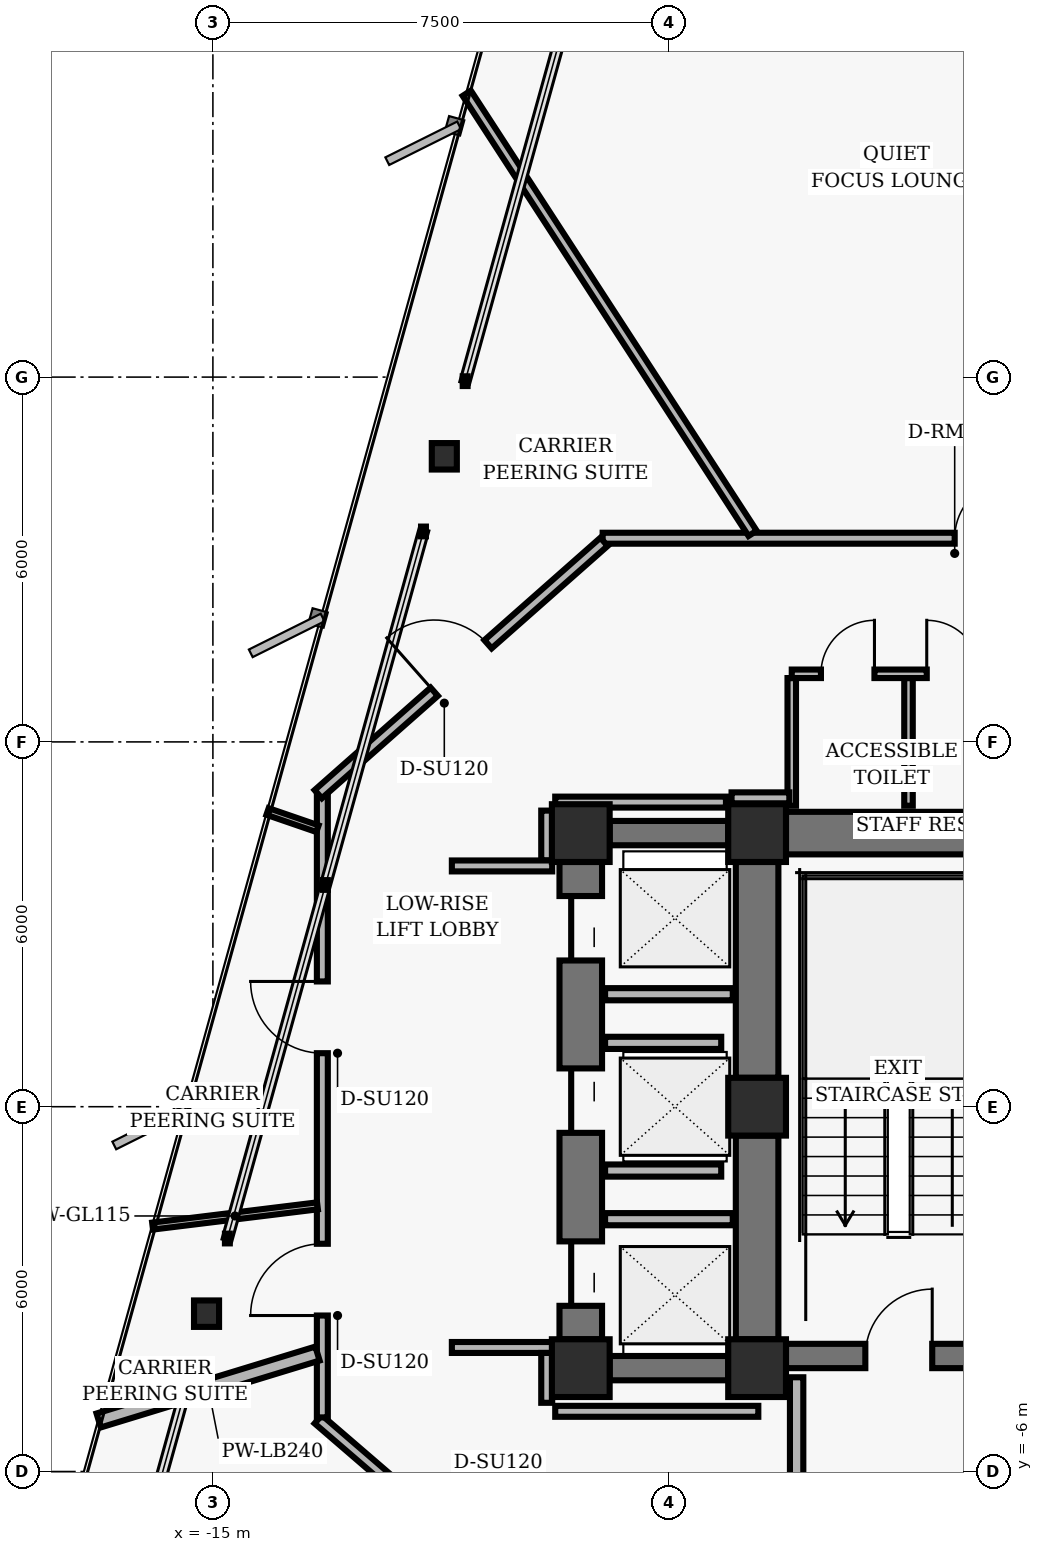
"""IFC4 building model, lengths in metres.
Left out: names, types, materials, properties, quantities, classifications, styles, units other than length and angle.
Written with IfcOpenShell. Run it as: python <this file> out.ifc"""

import sys

from ifc_helpers import new_model, si_unit, direction, frame, frame_2d, origin, origin_2d, place, context, subcontext, project, spatial, rectangle, hollow_rectangle, i_section, extrude, element, fill, save


model = new_model("IFC4")
c1 = context("Model", 3, precision=1e-05, world=origin(), true_north=direction((0.0, 1.0)))
c2 = subcontext(c1, "Body", "Model", "MODEL_VIEW")
j1 = project(units=[si_unit("LENGTHUNIT", "METRE"), si_unit("PLANEANGLEUNIT", "RADIAN")], contexts=[c1])
p1 = place(None, origin())
s1 = spatial("IfcSite", under=j1, at=p1, CompositionType="ELEMENT")
p2 = place(p1, origin())
s2 = spatial("IfcBuilding", under=s1, at=p2, CompositionType="ELEMENT")
p3 = place(p2, frame((0.0, 0.0, 94.72)))
s3 = spatial("IfcBuildingStorey", under=s2, at=p3, CompositionType="ELEMENT", Elevation=94.72)
for number, where, z_axis, x_axis in (
    (1, (-6.05, 4.5, 0.0), (0.0, 0.0, 1.0), (1.0, 0.0, 0.0)),
    (2, (-6.05, 0.0, 0.0), (0.0, 0.0, 1.0), (1.0, 0.0, 0.0)),
    (3, (-6.05, -4.3, 0.0), (0.0, 0.0, 1.0), (1.0, 0.0, 0.0)),
    (4, (-8.95, 4.5, 0.0), (0.0, 0.0, 1.0), (1.0, 0.0, 0.0)),
    (5, (-8.95, -4.3, 0.0), (0.0, 0.0, 1.0), (1.0, 0.0, 0.0)),
):
    element("IfcColumn", number, at=place(p3, frame(where, z_axis=z_axis, x_axis=x_axis)), inside=s3, PredefinedType="COLUMN", context=c2, shape_type="SweptSolid", body=[
        extrude(hollow_rectangle(XDim=0.95, YDim=0.95, WallThickness=0.06, InnerFilletRadius=0.02, OuterFilletRadius=0.04, at=origin_2d()), origin(), (0.0, 0.0, 1.0), 3.04),
    ])
p4 = place(p3, frame((-6.05, 0.475, 0.0), z_axis=(0.0, 0.0, 1.0), x_axis=(0.0, 1.0, 0.0)))
e6 = element("IfcWall", 6, at=p4, inside=s3, PredefinedType="SHEAR", context=c2, shape_type="SweptSolid", body=[
    extrude(rectangle(XDim=3.55, YDim=0.7, at=frame_2d((1.775, 0.0))), origin(), (0.0, 0.0, 1.0), 2.788),
])
p5 = place(p3, frame((-6.05, -3.825, 0.0), z_axis=(0.0, 0.0, 1.0), x_axis=(0.0, 1.0, 0.0)))
e7 = element("IfcWall", 7, at=p5, inside=s3, PredefinedType="SHEAR", context=c2, shape_type="SweptSolid", body=[
    extrude(rectangle(XDim=3.35, YDim=0.7, at=frame_2d((1.675, 0.0))), origin(), (0.0, 0.0, 1.0), 2.788),
])
p6 = place(p3, frame((-5.575, -4.1, 0.0), z_axis=(0.0, 0.0, 1.0), x_axis=(1.0, 0.0, 0.0)))
e8 = element("IfcWall", 8, at=p6, inside=s3, PredefinedType="SHEAR", context=c2, shape_type="SweptSolid", body=[
    extrude(rectangle(XDim=11.15, YDim=0.4, at=frame_2d((5.575, 0.0))), origin(), (0.0, 0.0, 1.0), 2.788),
])
p7 = place(p6, frame((1.305, 0.0, 0.0)))
e9 = element("IfcOpeningElement", 9, at=p7, cuts=e8, PredefinedType="OPENING", context=c2, shape_type="SweptSolid", body=[
    extrude(rectangle(XDim=1.1, YDim=2.04, at=frame_2d((0.55, 1.02))), frame((0.0, 0.21, 0.0), z_axis=(0.0, -1.0, 0.0), x_axis=(1.0, 0.0, 0.0)), (0.0, 0.0, 1.0), 0.42),
])
p8 = place(p6, frame((8.745, 0.0, 0.0)))
e10 = element("IfcOpeningElement", 10, at=p8, cuts=e8, PredefinedType="OPENING", context=c2, shape_type="SweptSolid", body=[
    extrude(rectangle(XDim=1.1, YDim=2.04, at=frame_2d((0.55, 1.02))), frame((0.0, 0.21, 0.0), z_axis=(0.0, -1.0, 0.0), x_axis=(1.0, 0.0, 0.0)), (0.0, 0.0, 1.0), 0.42),
])
p9 = place(p6, frame((4.045, 0.0, 0.0)))
e11 = element("IfcOpeningElement", 11, at=p9, cuts=e8, PredefinedType="OPENING", context=c2, shape_type="SweptSolid", body=[
    extrude(rectangle(XDim=1.06, YDim=2.04, at=frame_2d((0.53, 1.02))), frame((0.0, 0.21, 0.0), z_axis=(0.0, -1.0, 0.0), x_axis=(1.0, 0.0, 0.0)), (0.0, 0.0, 1.0), 0.42),
])
p10 = place(p6, frame((6.045, 0.0, 0.0)))
e12 = element("IfcOpeningElement", 12, at=p10, cuts=e8, PredefinedType="OPENING", context=c2, shape_type="SweptSolid", body=[
    extrude(rectangle(XDim=1.06, YDim=2.04, at=frame_2d((0.53, 1.02))), frame((0.0, 0.21, 0.0), z_axis=(0.0, -1.0, 0.0), x_axis=(1.0, 0.0, 0.0)), (0.0, 0.0, 1.0), 0.42),
])
p11 = place(p3, frame((-5.575, 4.5, 0.0), z_axis=(0.0, 0.0, 1.0), x_axis=(1.0, 0.0, 0.0)))
e13 = element("IfcWall", 13, at=p11, inside=s3, PredefinedType="SHEAR", context=c2, shape_type="SweptSolid", body=[
    extrude(rectangle(XDim=3.525, YDim=0.7, at=frame_2d((1.762, 0.0))), origin(), (0.0, 0.0, 1.0), 2.788),
])
p12 = place(p3, frame((-8.95, -3.825, 0.0), z_axis=(0.0, 0.0, 1.0), x_axis=(0.0, 1.0, 0.0)))
e14 = element("IfcWall", 14, at=p12, inside=s3, PredefinedType="SHEAR", context=c2, shape_type="SweptSolid", body=[
    extrude(rectangle(XDim=7.85, YDim=0.7, at=frame_2d((3.925, 0.0))), origin(), (0.0, 0.0, 1.0), 2.788),
])
p13 = place(p12, frame((0.55, 0.0, 0.0)))
e15 = element("IfcOpeningElement", 15, at=p13, cuts=e14, PredefinedType="OPENING", context=c2, shape_type="SweptSolid", body=[
    extrude(rectangle(XDim=1.06, YDim=2.04, at=frame_2d((0.53, 1.02))), frame((0.0, 0.36, 0.0), z_axis=(0.0, -1.0, 0.0), x_axis=(1.0, 0.0, 0.0)), (0.0, 0.0, 1.0), 0.72),
])
p14 = place(p12, frame((3.395, 0.0, 0.0)))
e16 = element("IfcOpeningElement", 16, at=p14, cuts=e14, PredefinedType="OPENING", context=c2, shape_type="SweptSolid", body=[
    extrude(rectangle(XDim=1.06, YDim=2.04, at=frame_2d((0.53, 1.02))), frame((0.0, 0.36, 0.0), z_axis=(0.0, -1.0, 0.0), x_axis=(1.0, 0.0, 0.0)), (0.0, 0.0, 1.0), 0.72),
])
p15 = place(p12, frame((6.23, 0.0, 0.0)))
e17 = element("IfcOpeningElement", 17, at=p15, cuts=e14, PredefinedType="OPENING", context=c2, shape_type="SweptSolid", body=[
    extrude(rectangle(XDim=1.06, YDim=2.04, at=frame_2d((0.53, 1.02))), frame((0.0, 0.36, 0.0), z_axis=(0.0, -1.0, 0.0), x_axis=(1.0, 0.0, 0.0)), (0.0, 0.0, 1.0), 0.72),
])
for number, where, z_axis, x_axis in (
    (18, (-8.475, 4.5, 0.0), (0.0, 0.0, 1.0), (1.0, 0.0, 0.0)),
    (19, (-8.475, -4.3, 0.0), (0.0, 0.0, 1.0), (1.0, 0.0, 0.0)),
):
    element("IfcWall", number, at=place(p3, frame(where, z_axis=z_axis, x_axis=x_axis)), inside=s3, PredefinedType="SHEAR", context=c2, shape_type="SweptSolid", body=[
        extrude(rectangle(XDim=1.95, YDim=0.4, at=frame_2d((0.975, 0.0))), origin(), (0.0, 0.0, 1.0), 2.788),
    ])
for number, where, z_axis, x_axis in (
    (20, (-11.194, 10.697, 0.0), (0.0, 0.0, 1.0), (1.0, 0.0, 0.0)),
    (21, (-15.104, -3.404, 0.0), (0.0, 0.0, 1.0), (1.0, 0.0, 0.0)),
):
    element("IfcColumn", number, at=place(p3, frame(where, z_axis=z_axis, x_axis=x_axis)), inside=s3, PredefinedType="COLUMN", context=c2, shape_type="SweptSolid", body=[
        extrude(i_section(OverallWidth=0.412, OverallDepth=0.435, WebThickness=0.036, FlangeThickness=0.057, FilletRadius=0.022, at=origin_2d()), origin(), (0.0, 0.0, 1.0), 3.04),
    ])
p16 = place(p3, frame((-5.4, -7.16, 0.0), z_axis=(0.0, 0.0, 1.0), x_axis=(0.0, 1.0, 0.0)))
e22 = element("IfcWall", 22, at=p16, inside=s3, PredefinedType="PARTITIONING", context=c2, shape_type="SweptSolid", body=[
    extrude(rectangle(XDim=2.71, YDim=0.22, at=frame_2d((1.355, 0.0))), origin(), (0.0, 0.0, 1.0), 2.763),
])
for number, where, z_axis, x_axis in (
    (23, (-5.48, 4.95, 0.0), (0.0, 0.0, 1.0), (0.0, 1.0, 0.0)),
    (24, (-3.56, 4.95, 0.0), (0.0, 0.0, 1.0), (0.0, 1.0, 0.0)),
):
    element("IfcWall", number, at=place(p3, frame(where, z_axis=z_axis, x_axis=x_axis)), inside=s3, PredefinedType="PARTITIONING", context=c2, shape_type="SweptSolid", body=[
        extrude(rectangle(XDim=2.1, YDim=0.14, at=frame_2d((1.05, 0.0))), origin(), (0.0, 0.0, 1.0), 2.763),
    ])
p17 = place(p3, frame((-5.48, 7.12, 0.0), z_axis=(0.0, 0.0, 1.0), x_axis=(1.0, 0.0, 0.0)))
e25 = element("IfcWall", 25, at=p17, inside=s3, PredefinedType="PARTITIONING", context=c2, shape_type="SweptSolid", body=[
    extrude(rectangle(XDim=3.36, YDim=0.14, at=frame_2d((1.68, 0.0))), origin(), (0.0, 0.0, 1.0), 2.763),
])
p18 = place(p17, frame((0.48, 0.0, 0.0)))
e26 = element("IfcOpeningElement", 26, at=p18, cuts=e25, PredefinedType="OPENING", context=c2, shape_type="SweptSolid", body=[
    extrude(rectangle(XDim=0.88, YDim=2.02, at=frame_2d((0.44, 1.01))), frame((0.0, 0.08, 0.0), z_axis=(0.0, -1.0, 0.0), x_axis=(1.0, 0.0, 0.0)), (0.0, 0.0, 1.0), 0.16),
])
p19 = place(p17, frame((2.22, 0.0, 0.0)))
e27 = element("IfcOpeningElement", 27, at=p19, cuts=e25, PredefinedType="OPENING", context=c2, shape_type="SweptSolid", body=[
    extrude(rectangle(XDim=0.88, YDim=2.02, at=frame_2d((0.44, 1.01))), frame((0.0, 0.08, 0.0), z_axis=(0.0, -1.0, 0.0), x_axis=(1.0, 0.0, 0.0)), (0.0, 0.0, 1.0), 0.16),
])
for number, where, z_axis, x_axis in (
    (28, (-8.55, -1.85, 0.0), (0.0, 0.0, 1.0), (1.0, 0.0, 0.0)),
    (29, (-8.55, 1.85, 0.0), (0.0, 0.0, 1.0), (1.0, 0.0, 0.0)),
):
    element("IfcWall", number, at=place(p3, frame(where, z_axis=z_axis, x_axis=x_axis)), inside=s3, PredefinedType="PARTITIONING", context=c2, shape_type="SweptSolid", body=[
        extrude(rectangle(XDim=2.1, YDim=0.2, at=frame_2d((1.05, 0.0))), origin(), (0.0, 0.0, 1.0), 2.763),
    ])
for number, where, z_axis, x_axis in (
    (30, (-8.55, -1.05, 0.0), (0.0, 0.0, 1.0), (1.0, 0.0, 0.0)),
    (31, (-8.55, 1.05, 0.0), (0.0, 0.0, 1.0), (1.0, 0.0, 0.0)),
):
    element("IfcWall", number, at=place(p3, frame(where, z_axis=z_axis, x_axis=x_axis)), inside=s3, PredefinedType="PARTITIONING", context=c2, shape_type="SweptSolid", body=[
        extrude(rectangle(XDim=1.91, YDim=0.2, at=frame_2d((0.955, 0.0))), origin(), (0.0, 0.0, 1.0), 2.763),
    ])
p20 = place(p3, frame((-8.59, 9.35, 0.0), z_axis=(0.0, 0.0, 1.0), x_axis=(1.0, 0.0, 0.0)))
e32 = element("IfcWall", 32, at=p20, inside=s3, PredefinedType="PARTITIONING", context=c2, shape_type="SweptSolid", body=[
    extrude(rectangle(XDim=17.18, YDim=0.18, at=frame_2d((8.59, 0.0))), origin(), (0.0, 0.0, 1.0), 2.277),
])
p21 = place(p20, frame((12.912, 0.0, 0.0)))
e33 = element("IfcOpeningElement", 33, at=p21, cuts=e32, PredefinedType="OPENING", context=c2, shape_type="SweptSolid", body=[
    extrude(rectangle(XDim=1.18, YDim=2.02, at=frame_2d((0.59, 1.01))), frame((0.0, 0.1, 0.0), z_axis=(0.0, -1.0, 0.0), x_axis=(1.0, 0.0, 0.0)), (0.0, 0.0, 1.0), 0.2),
])
p22 = place(p20, frame((5.79, 0.0, 0.0)))
e34 = element("IfcOpeningElement", 34, at=p22, cuts=e32, PredefinedType="OPENING", context=c2, shape_type="SweptSolid", body=[
    extrude(rectangle(XDim=0.96, YDim=2.02, at=frame_2d((0.48, 1.01))), frame((0.0, 0.1, 0.0), z_axis=(0.0, -1.0, 0.0), x_axis=(1.0, 0.0, 0.0)), (0.0, 0.0, 1.0), 0.2),
])
p23 = place(p3, frame((-8.568, -9.191, 0.0), z_axis=(0.0, 0.0, 1.0), x_axis=(-0.757556899173, 0.652769135694, 0.0)))
e35 = element("IfcWall", 35, at=p23, inside=s3, PredefinedType="PARTITIONING", context=c2, shape_type="SweptSolid", body=[
    extrude(rectangle(XDim=6.204, YDim=0.18, at=frame_2d((3.102, 0.0))), origin(), (0.0, 0.0, 1.0), 2.763),
])
p24 = place(p23, frame((2.512, 0.0, 0.0)))
e36 = element("IfcOpeningElement", 36, at=p24, cuts=e35, PredefinedType="OPENING", context=c2, shape_type="SweptSolid", body=[
    extrude(rectangle(XDim=1.18, YDim=2.02, at=frame_2d((0.59, 1.01))), frame((0.0, 0.1, 0.0), z_axis=(0.0, -1.0, 0.0), x_axis=(1.0, 0.0, 0.0)), (0.0, 0.0, 1.0), 0.2),
])
p25 = place(p3, frame((-13.2, -5.11, 0.0), z_axis=(0.0, 0.0, 1.0), x_axis=(0.0, 1.0, 0.0)))
e37 = element("IfcWall", 37, at=p25, inside=s3, PredefinedType="PARTITIONING", context=c2, shape_type="SweptSolid", body=[
    extrude(rectangle(XDim=10.22, YDim=0.18, at=frame_2d((5.11, 0.0))), origin(), (0.0, 0.0, 1.0), 2.143),
])
p26 = place(p25, frame((1.676, 0.0, 0.0)))
e38 = element("IfcOpeningElement", 38, at=p26, cuts=e37, PredefinedType="OPENING", context=c2, shape_type="SweptSolid", body=[
    extrude(rectangle(XDim=1.18, YDim=2.02, at=frame_2d((0.59, 1.01))), frame((0.0, 0.1, 0.0), z_axis=(0.0, -1.0, 0.0), x_axis=(1.0, 0.0, 0.0)), (0.0, 0.0, 1.0), 0.2),
])
p27 = place(p25, frame((5.99, 0.0, 0.0)))
e39 = element("IfcOpeningElement", 39, at=p27, cuts=e37, PredefinedType="OPENING", context=c2, shape_type="SweptSolid", body=[
    extrude(rectangle(XDim=1.18, YDim=2.02, at=frame_2d((0.59, 1.01))), frame((0.0, 0.1, 0.0), z_axis=(0.0, -1.0, 0.0), x_axis=(1.0, 0.0, 0.0)), (0.0, 0.0, 1.0), 0.2),
])
p28 = place(p3, frame((-13.268, 5.14, 0.0), z_axis=(0.0, 0.0, 1.0), x_axis=(0.749626463267, 0.66186113768, 0.0)))
e40 = element("IfcWall", 40, at=p28, inside=s3, PredefinedType="PARTITIONING", context=c2, shape_type="SweptSolid", body=[
    extrude(rectangle(XDim=6.27, YDim=0.18, at=frame_2d((3.135, 0.0))), origin(), (0.0, 0.0, 1.0), 2.763),
])
p29 = place(p28, frame((2.545, 0.0, 0.0)))
e41 = element("IfcOpeningElement", 41, at=p29, cuts=e40, PredefinedType="OPENING", context=c2, shape_type="SweptSolid", body=[
    extrude(rectangle(XDim=1.18, YDim=2.02, at=frame_2d((0.59, 1.01))), frame((0.0, 0.1, 0.0), z_axis=(0.0, -1.0, 0.0), x_axis=(1.0, 0.0, 0.0)), (0.0, 0.0, 1.0), 0.2),
])
p30 = place(p3, frame((-9.51, 4.87, 0.0), z_axis=(0.0, 0.0, 1.0), x_axis=(0.0, -1.0, 0.0)))
e42 = element("IfcWall", 42, at=p30, inside=s3, PredefinedType="PARTITIONING", context=c2, shape_type="SweptSolid", body=[
    extrude(rectangle(XDim=0.82, YDim=0.18, at=frame_2d((0.41, 0.0))), origin(), (0.0, 0.0, 1.0), 2.277),
])
p31 = place(p3, frame((-9.42, 3.96, 0.0), z_axis=(0.0, 0.0, 1.0), x_axis=(-1.0, 0.0, 0.0)))
e43 = element("IfcWall", 43, at=p31, inside=s3, PredefinedType="PARTITIONING", context=c2, shape_type="SweptSolid", body=[
    extrude(rectangle(XDim=1.65, YDim=0.18, at=frame_2d((0.825, 0.0))), origin(), (0.0, 0.0, 1.0), 2.763),
])
p32 = place(p3, frame((-11.07, -3.96, 0.0), z_axis=(0.0, 0.0, 1.0), x_axis=(1.0, 0.0, 0.0)))
e44 = element("IfcWall", 44, at=p32, inside=s3, PredefinedType="PARTITIONING", context=c2, shape_type="SweptSolid", body=[
    extrude(rectangle(XDim=1.65, YDim=0.18, at=frame_2d((0.825, 0.0))), origin(), (0.0, 0.0, 1.0), 2.048),
])
p33 = place(p3, frame((-9.51, -4.05, 0.0), z_axis=(0.0, 0.0, 1.0), x_axis=(0.0, -1.0, 0.0)))
e45 = element("IfcWall", 45, at=p33, inside=s3, PredefinedType="PARTITIONING", context=c2, shape_type="SweptSolid", body=[
    extrude(rectangle(XDim=0.82, YDim=0.18, at=frame_2d((0.41, 0.0))), origin(), (0.0, 0.0, 1.0), 2.763),
])
p34 = place(p3, frame((-9.37, -5.01, 0.0), z_axis=(0.0, 0.0, 1.0), x_axis=(1.0, 0.0, 0.0)))
e46 = element("IfcWall", 46, at=p34, inside=s3, PredefinedType="PARTITIONING", context=c2, shape_type="SweptSolid", body=[
    extrude(rectangle(XDim=3.34, YDim=0.18, at=frame_2d((1.67, 0.0))), origin(), (0.0, 0.0, 1.0), 2.763),
])
p35 = place(p3, frame((-5.52, 5.08, 0.0), z_axis=(0.0, 0.0, 1.0), x_axis=(-1.0, 0.0, 0.0)))
e47 = element("IfcWall", 47, at=p35, inside=s3, PredefinedType="PARTITIONING", context=c2, shape_type="SweptSolid", body=[
    extrude(rectangle(XDim=0.95, YDim=0.18, at=frame_2d((0.475, 0.0))), origin(), (0.0, 0.0, 1.0), 2.763),
])
p36 = place(p3, frame((-6.562, 5.01, 0.0), z_axis=(0.0, 0.0, 1.0), x_axis=(-1.0, 0.0, 0.0)))
e48 = element("IfcWall", 48, at=p36, inside=s3, PredefinedType="PARTITIONING", context=c2, shape_type="SweptSolid", body=[
    extrude(rectangle(XDim=2.808, YDim=0.18, at=frame_2d((1.404, 0.0))), origin(), (0.0, 0.0, 1.0), 2.763),
])
p37 = place(p3, frame((-13.28, -1.631, 0.0), z_axis=(0.0, 0.0, 1.0), x_axis=(-0.992544972431, -0.121878946921, 0.0)))
e49 = element("IfcWall", 49, at=p37, inside=s3, PredefinedType="MOVABLE", context=c2, shape_type="SweptSolid", body=[
    extrude(rectangle(XDim=2.732, YDim=0.115, at=frame_2d((1.366, 0.0))), origin(), (0.0, 0.0, 1.0), 2.763),
])
p38 = place(p3, frame((-13.28, -4.06, 0.0), z_axis=(0.0, 0.0, 1.0), x_axis=(-0.956289598412, -0.292421278244, 0.0)))
e50 = element("IfcWall", 50, at=p38, inside=s3, PredefinedType="PARTITIONING", context=c2, shape_type="SweptSolid", body=[
    extrude(rectangle(XDim=3.763, YDim=0.24, at=frame_2d((1.881, 0.0))), origin(), (0.0, 0.0, 1.0), 2.763),
])
p39 = place(p3, frame((-6.124, 9.43, 0.0), z_axis=(0.0, 0.0, 1.0), x_axis=(-0.544640325453, 0.838669729924, 0.0)))
e51 = element("IfcWall", 51, at=p39, inside=s3, PredefinedType="PARTITIONING", context=c2, shape_type="SweptSolid", body=[
    extrude(rectangle(XDim=8.631, YDim=0.16, at=frame_2d((4.316, 0.0))), origin(), (0.0, 0.0, 1.0), 2.763),
])
p40 = place(p3, frame((-13.28, 4.573, 0.0), z_axis=(0.0, 0.0, 1.0), x_axis=(-0.945516304874, 0.325574749047, 0.0)))
e52 = element("IfcWall", 52, at=p40, inside=s3, PredefinedType="MOVABLE", context=c2, shape_type="SweptSolid", body=[
    extrude(rectangle(XDim=0.868, YDim=0.115, at=frame_2d((0.434, 0.0))), origin(), (0.0, 0.0, 1.0), 2.763),
])
p41 = place(p7, origin())
e53 = element("IfcDoor", 53, at=p41, inside=s3, OperationType="SINGLE_SWING_RIGHT", PredefinedType="DOOR", context=c2, shape_type="SweptSolid", body=[
    extrude(rectangle(XDim=1.1, YDim=2.04, at=frame_2d((0.55, 1.02))), frame((0.0, 0.025, 0.0), z_axis=(0.0, -1.0, 0.0), x_axis=(1.0, 0.0, 0.0)), (0.0, 0.0, 1.0), 0.05),
])
fill(e9, e53)
p42 = place(p18, origin())
e54 = element("IfcDoor", 54, at=p42, inside=s3, OperationType="SINGLE_SWING_RIGHT", PredefinedType="DOOR", context=c2, shape_type="SweptSolid", body=[
    extrude(rectangle(XDim=0.88, YDim=2.02, at=frame_2d((0.44, 1.01))), frame((0.0, 0.025, 0.0), z_axis=(0.0, -1.0, 0.0), x_axis=(1.0, 0.0, 0.0)), (0.0, 0.0, 1.0), 0.05),
])
fill(e26, e54)
p43 = place(p19, origin())
e55 = element("IfcDoor", 55, at=p43, inside=s3, OperationType="SINGLE_SWING_LEFT", PredefinedType="DOOR", context=c2, shape_type="SweptSolid", body=[
    extrude(rectangle(XDim=0.88, YDim=2.02, at=frame_2d((0.44, 1.01))), frame((0.0, 0.025, 0.0), z_axis=(0.0, -1.0, 0.0), x_axis=(1.0, 0.0, 0.0)), (0.0, 0.0, 1.0), 0.05),
])
fill(e27, e55)
p44 = place(p13, origin())
e56 = element("IfcDoor", 56, at=p44, inside=s3, OperationType="SLIDING_TO_LEFT", PredefinedType="DOOR", context=c2, shape_type="SweptSolid", body=[
    extrude(rectangle(XDim=1.06, YDim=2.04, at=frame_2d((0.53, 1.02))), frame((0.0, 0.025, 0.0), z_axis=(0.0, -1.0, 0.0), x_axis=(1.0, 0.0, 0.0)), (0.0, 0.0, 1.0), 0.05),
])
fill(e15, e56)
p45 = place(p14, origin())
e57 = element("IfcDoor", 57, at=p45, inside=s3, OperationType="SLIDING_TO_RIGHT", PredefinedType="DOOR", context=c2, shape_type="SweptSolid", body=[
    extrude(rectangle(XDim=1.06, YDim=2.04, at=frame_2d((0.53, 1.02))), frame((0.0, 0.025, 0.0), z_axis=(0.0, -1.0, 0.0), x_axis=(1.0, 0.0, 0.0)), (0.0, 0.0, 1.0), 0.05),
])
fill(e16, e57)
p46 = place(p15, origin())
e58 = element("IfcDoor", 58, at=p46, inside=s3, OperationType="SLIDING_TO_LEFT", PredefinedType="DOOR", context=c2, shape_type="SweptSolid", body=[
    extrude(rectangle(XDim=1.06, YDim=2.04, at=frame_2d((0.53, 1.02))), frame((0.0, 0.025, 0.0), z_axis=(0.0, -1.0, 0.0), x_axis=(1.0, 0.0, 0.0)), (0.0, 0.0, 1.0), 0.05),
])
fill(e17, e58)
p47 = place(p26, origin())
e59 = element("IfcDoor", 59, at=p47, inside=s3, OperationType="SINGLE_SWING_LEFT", PredefinedType="DOOR", context=c2, shape_type="SweptSolid", body=[
    extrude(rectangle(XDim=1.18, YDim=2.02, at=frame_2d((0.59, 1.01))), frame((0.0, 0.025, 0.0), z_axis=(0.0, -1.0, 0.0), x_axis=(1.0, 0.0, 0.0)), (0.0, 0.0, 1.0), 0.05),
])
fill(e38, e59)
p48 = place(p22, origin())
e60 = element("IfcDoor", 60, at=p48, inside=s3, OperationType="SINGLE_SWING_RIGHT", PredefinedType="DOOR", context=c2, shape_type="SweptSolid", body=[
    extrude(rectangle(XDim=0.96, YDim=2.02, at=frame_2d((0.48, 1.01))), frame((0.0, 0.025, 0.0), z_axis=(0.0, -1.0, 0.0), x_axis=(1.0, 0.0, 0.0)), (0.0, 0.0, 1.0), 0.05),
])
fill(e34, e60)
p49 = place(p29, origin())
e61 = element("IfcDoor", 61, at=p49, inside=s3, OperationType="SINGLE_SWING_LEFT", PredefinedType="DOOR", context=c2, shape_type="SweptSolid", body=[
    extrude(rectangle(XDim=1.18, YDim=2.02, at=frame_2d((0.59, 1.01))), frame((0.0, 0.025, 0.0), z_axis=(0.0, -1.0, 0.0), x_axis=(1.0, 0.0, 0.0)), (0.0, 0.0, 1.0), 0.05),
])
fill(e41, e61)
p50 = place(p27, origin())
e62 = element("IfcDoor", 62, at=p50, inside=s3, OperationType="SINGLE_SWING_RIGHT", PredefinedType="DOOR", context=c2, shape_type="SweptSolid", body=[
    extrude(rectangle(XDim=1.18, YDim=2.02, at=frame_2d((0.59, 1.01))), frame((0.0, 0.025, 0.0), z_axis=(0.0, -1.0, 0.0), x_axis=(1.0, 0.0, 0.0)), (0.0, 0.0, 1.0), 0.05),
])
fill(e39, e62)
save(model, sys.argv[1])
